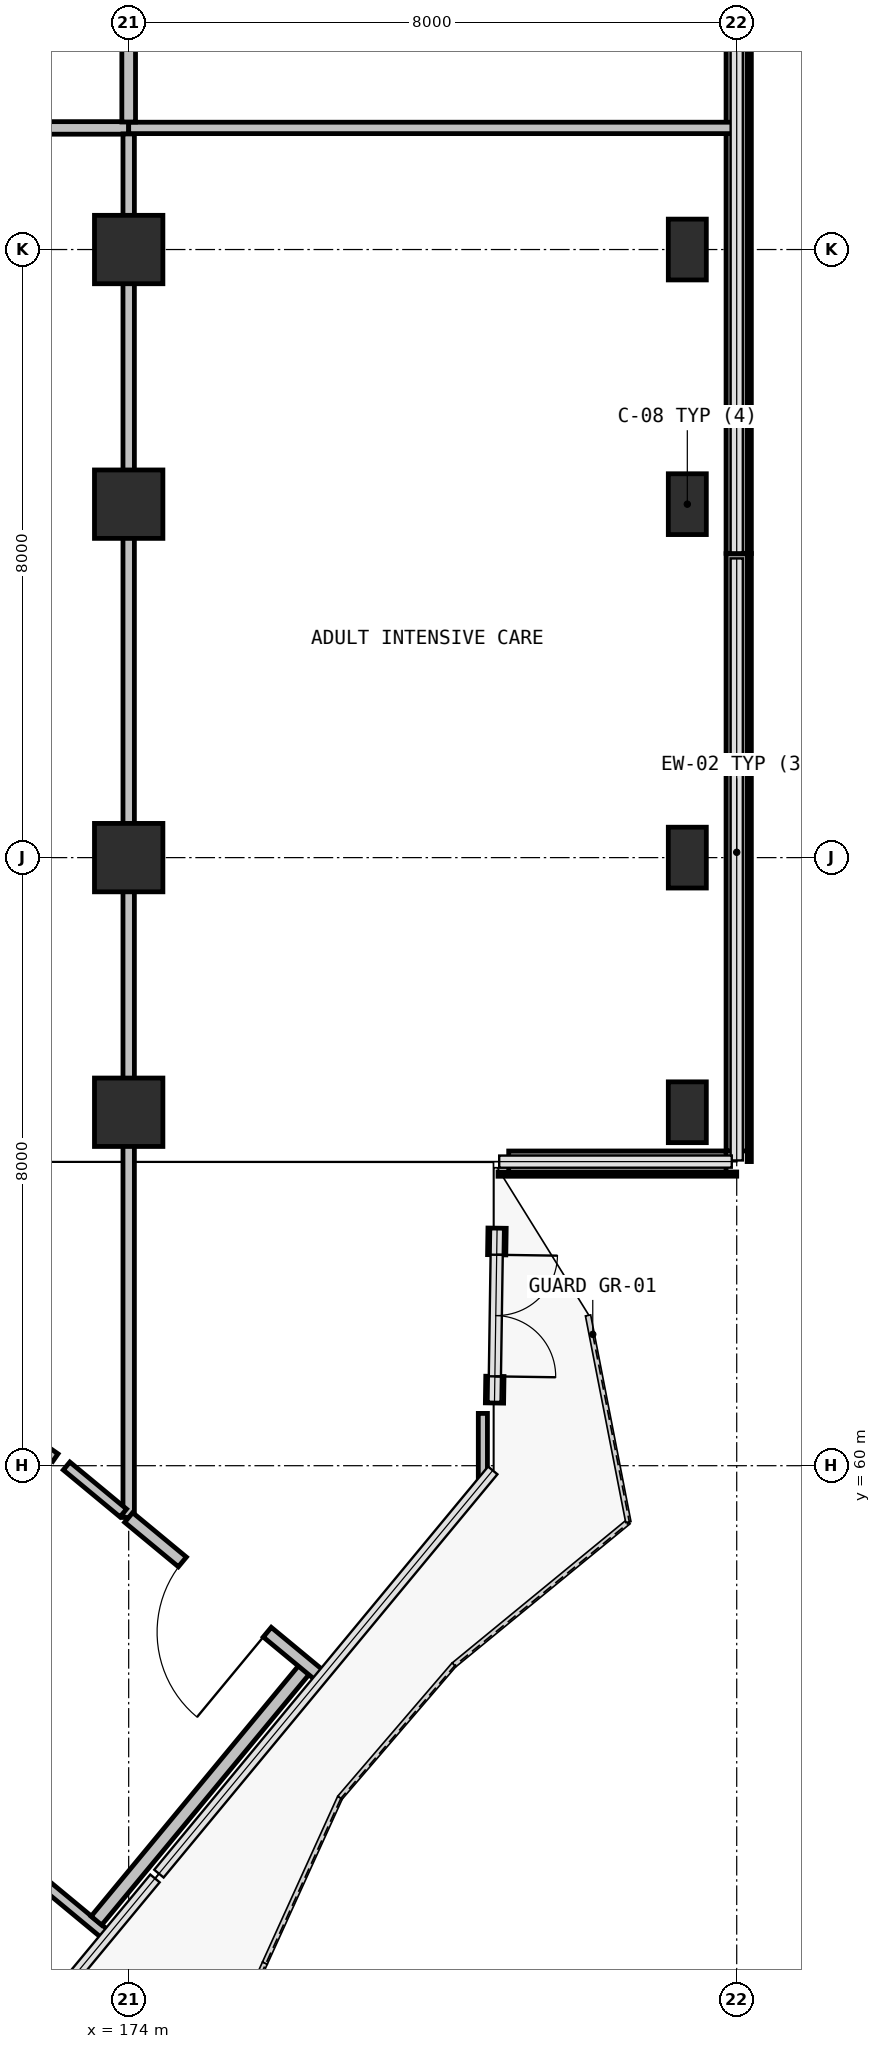
"""IFC4 building model, lengths in metres.
Left out: names, types, materials, properties, quantities, classifications, styles, units other than length and angle.
Written with IfcOpenShell. Run it as: python <this file> out.ifc"""

import sys

from ifc_helpers import new_model, si_unit, direction, frame, frame_2d, origin, origin_2d, place, context, subcontext, project, spatial, rectangle, extrude, element, fill, save


model = new_model("IFC4")
c1 = context("Model", 3, precision=1e-05, world=origin(), true_north=direction((0.0, 1.0)))
c2 = subcontext(c1, "Body", "Model", "MODEL_VIEW")
j1 = project(units=[si_unit("LENGTHUNIT", "METRE"), si_unit("PLANEANGLEUNIT", "RADIAN")], contexts=[c1])
p1 = place(None, origin())
s1 = spatial("IfcSite", under=j1, at=p1, CompositionType="ELEMENT")
p2 = place(p1, origin())
s2 = spatial("IfcBuilding", under=s1, at=p2, CompositionType="ELEMENT")
p3 = place(p2, frame((0.0, 0.0, 5.4)))
s3 = spatial("IfcBuildingStorey", under=s2, at=p3, CompositionType="ELEMENT", Elevation=5.4)
for number, where, z_axis, x_axis in (
    (1, (174.0, 64.65, 0.0), (0.0, 0.0, 1.0), (1.0, 0.0, 0.0)),
    (2, (174.0, 68.0, 0.0), (0.0, 0.0, 1.0), (1.0, 0.0, 0.0)),
    (3, (174.0, 72.65, 0.0), (0.0, 0.0, 1.0), (1.0, 0.0, 0.0)),
    (4, (174.0, 76.0, 0.0), (0.0, 0.0, 1.0), (1.0, 0.0, 0.0)),
):
    element("IfcColumn", number, at=place(p3, frame(where, z_axis=z_axis, x_axis=x_axis)), inside=s3, PredefinedType="COLUMN", context=c2, shape_type="SweptSolid", body=[
        extrude(rectangle(XDim=0.9, YDim=0.9, at=origin_2d()), origin(), (0.0, 0.0, 1.0), 4.8),
    ])
for number, where, z_axis, x_axis in (
    (5, (181.35, 64.65, 0.0), (0.0, 0.0, 1.0), (1.0, 0.0, 0.0)),
    (6, (181.35, 68.0, 0.0), (0.0, 0.0, 1.0), (1.0, 0.0, 0.0)),
    (7, (181.35, 72.65, 0.0), (0.0, 0.0, 1.0), (1.0, 0.0, 0.0)),
    (8, (181.35, 76.0, 0.0), (0.0, 0.0, 1.0), (1.0, 0.0, 0.0)),
):
    element("IfcColumn", number, at=place(p3, frame(where, z_axis=z_axis, x_axis=x_axis)), inside=s3, PredefinedType="COLUMN", context=c2, shape_type="SweptSolid", body=[
        extrude(rectangle(XDim=0.5, YDim=0.8, at=origin_2d()), origin(), (0.0, 0.0, 1.0), 4.8),
    ])
p4 = place(p3, frame((182.0, 79.999, 0.0), z_axis=(0.0, 0.0, 1.0), x_axis=(0.0, -1.0, 0.0)))
e9 = element("IfcWall", 9, at=p4, inside=s3, PredefinedType="SOLIDWALL", context=c2, shape_type="SweptSolid", body=[
    extrude(rectangle(XDim=7.996, YDim=0.28, at=frame_2d((3.998, 0.0))), origin(), (0.0, 0.0, 1.0), 0.94),
])
p5 = place(p3, frame((182.0, 71.999, 0.0), z_axis=(0.0, 0.0, 1.0), x_axis=(0.0, -1.0, 0.0)))
e10 = element("IfcWall", 10, at=p5, inside=s3, PredefinedType="SOLIDWALL", context=c2, shape_type="SweptSolid", body=[
    extrude(rectangle(XDim=7.858, YDim=0.28, at=frame_2d((3.929, 0.0))), origin(), (0.0, 0.0, 1.0), 0.94),
])
p6 = place(p3, frame((181.86, 64.001, 0.0), z_axis=(0.0, 0.0, 1.0), x_axis=(-0.999999941708, -0.000341442575, 0.0)))
e11 = element("IfcWall", 11, at=p6, inside=s3, PredefinedType="SOLIDWALL", context=c2, shape_type="SweptSolid", body=[
    extrude(rectangle(XDim=2.86, YDim=0.28, at=frame_2d((1.43, 0.0))), origin(), (0.0, 0.0, 1.0), 0.94),
])
p7 = place(p3, frame((178.847, 63.125, 0.0), z_axis=(0.0, 0.0, 1.0), x_axis=(-0.014752666714, -0.999891173491, 0.0)))
e12 = element("IfcWall", 12, at=p7, inside=s3, PredefinedType="SOLIDWALL", context=c2, shape_type="SweptSolid", body=[
    extrude(rectangle(XDim=2.3, YDim=0.24, at=frame_2d((1.15, 0.0))), origin(), (0.0, 0.0, 1.0), 2.32),
])
p8 = place(p7, frame((0.35, 0.0, 0.0)))
e13 = element("IfcOpeningElement", 13, at=p8, cuts=e12, PredefinedType="OPENING", context=c2, shape_type="SweptSolid", body=[
    extrude(rectangle(XDim=1.6, YDim=2.2, at=frame_2d((0.8, 1.1))), frame((0.0, 0.13, 0.0), z_axis=(0.0, -1.0, 0.0), x_axis=(1.0, 0.0, 0.0)), (0.0, 0.0, 1.0), 0.26),
])
p9 = place(p3, frame((170.434, 56.533, 0.0), z_axis=(0.0, 0.0, 1.0), x_axis=(0.770184287696, -0.637821419353, 0.0)))
e14 = element("IfcWall", 14, at=p9, inside=s3, PredefinedType="PARTITIONING", context=c2, shape_type="SweptSolid", body=[
    extrude(rectangle(XDim=4.253, YDim=0.135, at=frame_2d((2.127, 0.0))), origin(), (0.0, 0.0, 1.0), 4.445),
])
p10 = place(p9, frame((1.452, 0.0, 0.0)))
e15 = element("IfcOpeningElement", 15, at=p10, cuts=e14, PredefinedType="OPENING", context=c2, shape_type="SweptSolid", body=[
    extrude(rectangle(XDim=1.35, YDim=2.15, at=frame_2d((0.675, 1.075))), frame((0.0, 0.077, 0.0), z_axis=(0.0, -1.0, 0.0), x_axis=(1.0, 0.0, 0.0)), (0.0, 0.0, 1.0), 0.155),
])
p11 = place(p3, frame((173.036, 60.107, 0.0), z_axis=(0.0, 0.0, 1.0), x_axis=(-0.820574971601, 0.571538901547, 0.0)))
e16 = element("IfcWall", 16, at=p11, inside=s3, PredefinedType="PARTITIONING", context=c2, shape_type="SweptSolid", body=[
    extrude(rectangle(XDim=4.357, YDim=0.12, at=frame_2d((2.178, 0.0))), origin(), (0.0, 0.0, 1.0), 4.445),
])
p12 = place(p11, frame((1.528, 0.0, 0.0)))
e17 = element("IfcOpeningElement", 17, at=p12, cuts=e16, PredefinedType="OPENING", context=c2, shape_type="SweptSolid", body=[
    extrude(rectangle(XDim=1.3, YDim=2.15, at=frame_2d((0.65, 1.075))), frame((0.0, 0.07, 0.0), z_axis=(0.0, -1.0, 0.0), x_axis=(1.0, 0.0, 0.0)), (0.0, 0.0, 1.0), 0.14),
])
p13 = place(p3, frame((165.6, 77.6, 0.0), z_axis=(0.0, 0.0, 1.0), x_axis=(1.0, 0.0, 0.0)))
e18 = element("IfcWall", 18, at=p13, inside=s3, PredefinedType="PARTITIONING", context=c2, shape_type="SweptSolid", body=[
    extrude(rectangle(XDim=8.4, YDim=0.165, at=frame_2d((4.2, 0.0))), origin(), (0.0, 0.0, 1.0), 4.445),
])
p14 = place(p3, frame((174.0, 77.521, 0.0), z_axis=(0.0, 0.0, 1.0), x_axis=(0.0, -1.0, 0.0)))
e19 = element("IfcWall", 19, at=p14, inside=s3, PredefinedType="PARTITIONING", context=c2, shape_type="SweptSolid", body=[
    extrude(rectangle(XDim=18.202, YDim=0.15, at=frame_2d((9.101, 0.0))), origin(), (0.0, 0.0, 1.0), 3.695),
])
p15 = place(p3, frame((173.929, 59.378, 0.0), z_axis=(0.0, 0.0, 1.0), x_axis=(-0.769933113357, 0.638124596733, 0.0)))
e20 = element("IfcWall", 20, at=p15, inside=s3, PredefinedType="PARTITIONING", context=c2, shape_type="SweptSolid", body=[
    extrude(rectangle(XDim=0.969, YDim=0.135, at=frame_2d((0.484, 0.0))), origin(), (0.0, 0.0, 1.0), 4.445),
])
p16 = place(p3, frame((178.66, 60.688, 0.0), z_axis=(0.0, 0.0, 1.0), x_axis=(0.0, -1.0, 0.0)))
e21 = element("IfcWall", 21, at=p16, inside=s3, PredefinedType="PARTITIONING", context=c2, shape_type="SweptSolid", body=[
    extrude(rectangle(XDim=0.89, YDim=0.12, at=frame_2d((0.445, 0.0))), origin(), (0.0, 0.0, 1.0), 4.445),
])
p17 = place(p3, frame((173.575, 54.014, 0.0), z_axis=(0.0, 0.0, 1.0), x_axis=(0.637654919924, 0.770322142416, 0.0)))
e22 = element("IfcWall", 22, at=p17, inside=s3, PredefinedType="PARTITIONING", context=c2, shape_type="SweptSolid", body=[
    extrude(rectangle(XDim=4.297, YDim=0.18, at=frame_2d((2.148, 0.0))), origin(), (0.0, 0.0, 1.0), 4.445),
])
p18 = place(p3, frame((176.53, 57.225, 0.0), z_axis=(0.0, 0.0, 1.0), x_axis=(-0.770367879737, 0.637599662695, 0.0)))
e23 = element("IfcWall", 23, at=p18, inside=s3, PredefinedType="PARTITIONING", context=c2, shape_type="SweptSolid", body=[
    extrude(rectangle(XDim=3.284, YDim=0.165, at=frame_2d((1.642, 0.0))), origin(), (0.0, 0.0, 1.0), 4.445),
])
p19 = place(p18, frame((0.917, 0.0, 0.0)))
e24 = element("IfcOpeningElement", 24, at=p19, cuts=e23, PredefinedType="OPENING", context=c2, shape_type="SweptSolid", body=[
    extrude(rectangle(XDim=1.45, YDim=2.15, at=frame_2d((0.725, 1.075))), frame((0.0, 0.093, 0.0), z_axis=(0.0, -1.0, 0.0), x_axis=(1.0, 0.0, 0.0)), (0.0, 0.0, 1.0), 0.185),
])
p20 = place(p3, frame((174.0, 77.6, 0.0), z_axis=(0.0, 0.0, 1.0), x_axis=(1.0, 0.0, 0.0)))
e25 = element("IfcWall", 25, at=p20, inside=s3, PredefinedType="PARTITIONING", context=c2, shape_type="SweptSolid", body=[
    extrude(rectangle(XDim=7.958, YDim=0.15, at=frame_2d((3.979, 0.0))), origin(), (0.0, 0.0, 1.0), 4.445),
])
p21 = place(p3, frame((174.0, 105.384, 0.0), z_axis=(0.0, 0.0, 1.0), x_axis=(0.0, -1.0, 0.0)))
e26 = element("IfcWall", 26, at=p21, inside=s3, PredefinedType="PARTITIONING", context=c2, shape_type="SweptSolid", body=[
    extrude(rectangle(XDim=27.706, YDim=0.18, at=frame_2d((13.853, 0.0))), origin(), (0.0, 0.0, 1.0), 3.695),
])
p22 = place(p8, origin())
e27 = element("IfcDoor", 27, at=p22, inside=s3, OperationType="DOUBLE_DOOR_SINGLE_SWING", PredefinedType="DOOR", context=c2, shape_type="SweptSolid", body=[
    extrude(rectangle(XDim=1.6, YDim=2.2, at=frame_2d((0.8, 1.1))), frame((0.0, 0.025, 0.0), z_axis=(0.0, -1.0, 0.0), x_axis=(1.0, 0.0, 0.0)), (0.0, 0.0, 1.0), 0.05),
])
fill(e13, e27)
p23 = place(p19, origin())
e28 = element("IfcDoor", 28, at=p23, inside=s3, OperationType="SINGLE_SWING_LEFT", PredefinedType="DOOR", context=c2, shape_type="SweptSolid", body=[
    extrude(rectangle(XDim=1.45, YDim=2.15, at=frame_2d((0.725, 1.075))), frame((0.0, 0.025, 0.0), z_axis=(0.0, -1.0, 0.0), x_axis=(1.0, 0.0, 0.0)), (0.0, 0.0, 1.0), 0.05),
])
fill(e24, e28)
save(model, sys.argv[1])
